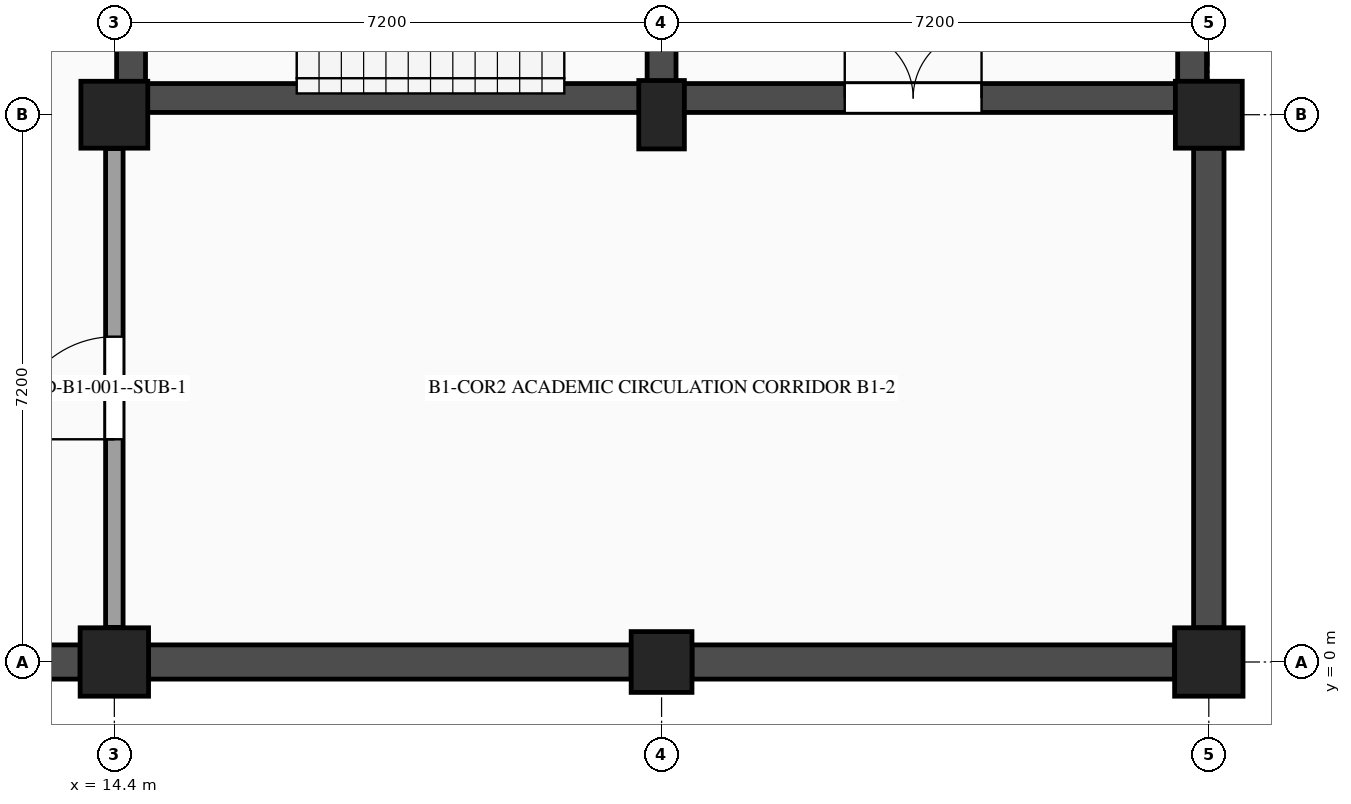
"""IFC4 building model, lengths in metres.
Left out: names, types, materials, properties, quantities, classifications, styles, units other than length and angle.
Written with IfcOpenShell. Run it as: python <this file> out.ifc"""

import sys

from ifc_helpers import new_model, si_unit, direction, frame, frame_2d, origin, origin_2d, place, context, subcontext, project, spatial, rectangle, extrude, element, fill, save


model = new_model("IFC4")
c1 = context("Model", 3, precision=1e-05, world=origin(), true_north=direction((0.0, 1.0)))
c2 = subcontext(c1, "Body", "Model", "MODEL_VIEW")
j1 = project(units=[si_unit("LENGTHUNIT", "METRE"), si_unit("PLANEANGLEUNIT", "RADIAN")], contexts=[c1])
p1 = place(None, origin())
s1 = spatial("IfcSite", under=j1, at=p1, CompositionType="ELEMENT")
p2 = place(p1, origin())
s2 = spatial("IfcBuilding", under=s1, at=p2, CompositionType="ELEMENT")
p3 = place(p2, frame((0.0, 0.0, -4.5)))
s3 = spatial("IfcBuildingStorey", under=s2, at=p3, CompositionType="ELEMENT", Elevation=-4.5)
p4 = place(p3, frame((14.4, 0.0, -0.45), z_axis=(0.0, 0.0, 1.0), x_axis=(1.0, 0.0, 0.0)))
e1 = element("IfcColumn", 1, at=p4, inside=s3, PredefinedType="COLUMN", context=c2, shape_type="SweptSolid", body=[
    extrude(rectangle(XDim=0.9, YDim=0.9, at=origin_2d()), origin(), (0.0, 0.0, 1.0), 4.95),
])
p5 = place(p3, frame((14.4, 7.2, -0.45), z_axis=(0.0, 0.0, 1.0), x_axis=(1.0, 0.0, 0.0)))
e2 = element("IfcColumn", 2, at=p5, inside=s3, PredefinedType="COLUMN", context=c2, shape_type="SweptSolid", body=[
    extrude(rectangle(XDim=0.88, YDim=0.88, at=origin_2d()), origin(), (0.0, 0.0, 1.0), 4.95),
])
p6 = place(p3, frame((21.6, 0.0, -0.45), z_axis=(0.0, 0.0, 1.0), x_axis=(1.0, 0.0, 0.0)))
e3 = element("IfcColumn", 3, at=p6, inside=s3, PredefinedType="COLUMN", context=c2, shape_type="SweptSolid", body=[
    extrude(rectangle(XDim=0.8, YDim=0.8, at=origin_2d()), origin(), (0.0, 0.0, 1.0), 4.95),
])
p7 = place(p3, frame((21.6, 7.2, -0.45), z_axis=(0.0, 0.0, 1.0), x_axis=(1.0, 0.0, 0.0)))
e4 = element("IfcColumn", 4, at=p7, inside=s3, PredefinedType="COLUMN", context=c2, shape_type="SweptSolid", body=[
    extrude(rectangle(XDim=0.6, YDim=0.9, at=origin_2d()), origin(), (0.0, 0.0, 1.0), 4.95),
])
p8 = place(p3, frame((28.8, 0.0, -0.45), z_axis=(0.0, 0.0, 1.0), x_axis=(1.0, 0.0, 0.0)))
e5 = element("IfcColumn", 5, at=p8, inside=s3, PredefinedType="COLUMN", context=c2, shape_type="SweptSolid", body=[
    extrude(rectangle(XDim=0.9, YDim=0.9, at=origin_2d()), origin(), (0.0, 0.0, 1.0), 4.95),
])
p9 = place(p3, frame((28.8, 7.2, -0.45), z_axis=(0.0, 0.0, 1.0), x_axis=(1.0, 0.0, 0.0)))
e6 = element("IfcColumn", 6, at=p9, inside=s3, PredefinedType="COLUMN", context=c2, shape_type="SweptSolid", body=[
    extrude(rectangle(XDim=0.88, YDim=0.88, at=origin_2d()), origin(), (0.0, 0.0, 1.0), 4.95),
])
p10 = place(p3, frame((28.8, 6.76, 0.0), z_axis=(0.0, 0.0, 1.0), x_axis=(0.0, -1.0, 0.0)))
e7 = element("IfcWall", 7, at=p10, inside=s3, PredefinedType="SOLIDWALL", context=c2, shape_type="SweptSolid", body=[
    extrude(rectangle(XDim=6.31, YDim=0.4, at=frame_2d((3.155, 0.0))), origin(), (0.0, 0.0, 1.0), 4.17),
])
p11 = place(p3, frame((28.35, 0.0, 0.0), z_axis=(0.0, 0.0, 1.0), x_axis=(-1.0, 0.0, 0.0)))
e8 = element("IfcWall", 8, at=p11, inside=s3, PredefinedType="SOLIDWALL", context=c2, shape_type="SweptSolid", body=[
    extrude(rectangle(XDim=6.35, YDim=0.45, at=frame_2d((3.175, 0.0))), origin(), (0.0, 0.0, 1.0), 4.17),
])
for number, where, z_axis, x_axis in (
    (9, (21.2, 0.0, 0.0), (0.0, 0.0, 1.0), (-1.0, 0.0, 0.0)),
    (10, (13.95, 0.0, 0.0), (0.0, 0.0, 1.0), (-1.0, 0.0, 0.0)),
):
    element("IfcWall", number, at=place(p3, frame(where, z_axis=z_axis, x_axis=x_axis)), inside=s3, PredefinedType="SOLIDWALL", context=c2, shape_type="SweptSolid", body=[
        extrude(rectangle(XDim=6.35, YDim=0.45, at=frame_2d((3.175, 0.0))), origin(), (0.0, 0.0, 1.0), 4.17),
    ])
p12 = place(p3, frame((14.81, 7.42, 0.0), z_axis=(0.0, 0.0, 1.0), x_axis=(1.0, 0.0, 0.0)))
e11 = element("IfcWall", 11, at=p12, inside=s3, PredefinedType="SHEAR", context=c2, shape_type="SweptSolid", body=[
    extrude(rectangle(XDim=6.6, YDim=0.38, at=frame_2d((3.3, 0.0))), origin(), (0.0, 0.0, 1.0), 4.17),
])
p13 = place(p3, frame((14.62, 14.37, 0.0), z_axis=(0.0, 0.0, 1.0), x_axis=(0.0, -1.0, 0.0)))
e12 = element("IfcWall", 12, at=p13, inside=s3, PredefinedType="SHEAR", context=c2, shape_type="SweptSolid", body=[
    extrude(rectangle(XDim=7.14, YDim=0.38, at=frame_2d((3.57, 0.0))), origin(), (0.0, 0.0, 1.0), 4.17),
])
p14 = place(p3, frame((21.6, 7.23, 0.0), z_axis=(0.0, 0.0, 1.0), x_axis=(0.0, 1.0, 0.0)))
e13 = element("IfcWall", 13, at=p14, inside=s3, PredefinedType="SHEAR", context=c2, shape_type="SweptSolid", body=[
    extrude(rectangle(XDim=7.14, YDim=0.38, at=frame_2d((3.57, 0.0))), origin(), (0.0, 0.0, 1.0), 4.17),
])
p15 = place(p14, frame((1.4, 0.0, 0.0)))
e14 = element("IfcOpeningElement", 14, at=p15, cuts=e13, PredefinedType="OPENING", context=c2, shape_type="SweptSolid", body=[
    extrude(rectangle(XDim=1.8, YDim=2.2, at=frame_2d((0.9, 1.1))), frame((0.0, 0.2, 0.0), z_axis=(0.0, -1.0, 0.0), x_axis=(1.0, 0.0, 0.0)), (0.0, 0.0, 1.0), 0.4),
])
p16 = place(p3, frame((21.79, 7.42, 0.0), z_axis=(0.0, 0.0, 1.0), x_axis=(1.0, 0.0, 0.0)))
e15 = element("IfcWall", 15, at=p16, inside=s3, PredefinedType="SHEAR", context=c2, shape_type="SweptSolid", body=[
    extrude(rectangle(XDim=6.6, YDim=0.38, at=frame_2d((3.3, 0.0))), origin(), (0.0, 0.0, 1.0), 4.17),
])
p17 = place(p16, frame((2.22, 0.0, 0.0)))
e16 = element("IfcOpeningElement", 16, at=p17, cuts=e15, PredefinedType="OPENING", context=c2, shape_type="SweptSolid", body=[
    extrude(rectangle(XDim=1.8, YDim=2.2, at=frame_2d((0.9, 1.1))), frame((0.0, 0.2, 0.0), z_axis=(0.0, -1.0, 0.0), x_axis=(1.0, 0.0, 0.0)), (0.0, 0.0, 1.0), 0.4),
])
p18 = place(p3, frame((28.58, 7.23, 0.0), z_axis=(0.0, 0.0, 1.0), x_axis=(0.0, 1.0, 0.0)))
e17 = element("IfcWall", 17, at=p18, inside=s3, PredefinedType="SHEAR", context=c2, shape_type="SweptSolid", body=[
    extrude(rectangle(XDim=7.14, YDim=0.38, at=frame_2d((3.57, 0.0))), origin(), (0.0, 0.0, 1.0), 4.17),
])
p19 = place(p3, frame((14.4, 0.455, 0.0), z_axis=(0.0, 0.0, 1.0), x_axis=(0.0, 1.0, 0.0)))
e18 = element("IfcWall", 18, at=p19, inside=s3, PredefinedType="PARTITIONING", context=c2, shape_type="SweptSolid", body=[
    extrude(rectangle(XDim=6.3, YDim=0.23, at=frame_2d((3.15, 0.0))), origin(), (0.0, 0.0, 1.0), 3.54),
])
p20 = place(p19, frame((2.475, 0.0, 0.0)))
e19 = element("IfcOpeningElement", 19, at=p20, cuts=e18, PredefinedType="OPENING", context=c2, shape_type="SweptSolid", body=[
    extrude(rectangle(XDim=1.35, YDim=2.15, at=frame_2d((0.675, 1.075))), frame((0.0, 0.125, 0.0), z_axis=(0.0, -1.0, 0.0), x_axis=(1.0, 0.0, 0.0)), (0.0, 0.0, 1.0), 0.25),
])
p21 = place(p17, origin())
e20 = element("IfcDoor", 20, at=p21, inside=s3, OperationType="DOUBLE_DOOR_SINGLE_SWING", PredefinedType="DOOR", context=c2, shape_type="SweptSolid", body=[
    extrude(rectangle(XDim=1.8, YDim=2.2, at=frame_2d((0.9, 1.1))), frame((0.0, 0.025, 0.0), z_axis=(0.0, -1.0, 0.0), x_axis=(1.0, 0.0, 0.0)), (0.0, 0.0, 1.0), 0.05),
])
fill(e16, e20)
p22 = place(p20, origin())
e21 = element("IfcDoor", 21, at=p22, inside=s3, OperationType="SINGLE_SWING_LEFT", PredefinedType="DOOR", context=c2, shape_type="SweptSolid", body=[
    extrude(rectangle(XDim=1.35, YDim=2.15, at=frame_2d((0.675, 1.075))), frame((0.0, 0.025, 0.0), z_axis=(0.0, -1.0, 0.0), x_axis=(1.0, 0.0, 0.0)), (0.0, 0.0, 1.0), 0.05),
])
fill(e19, e21)
save(model, sys.argv[1])
